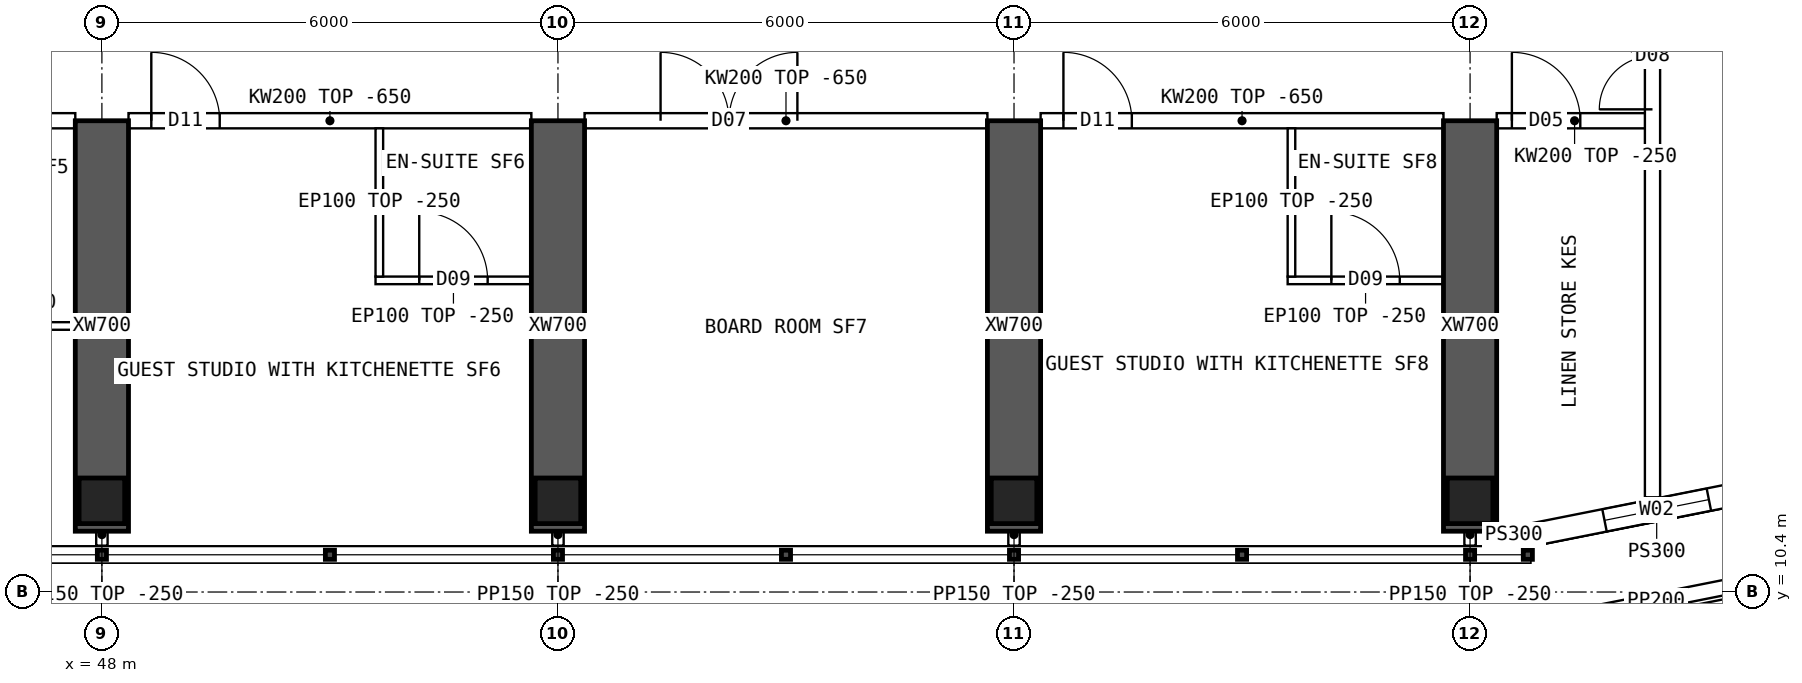
"""IFC4 building model, lengths in metres.
Left out: names, types, materials, properties, quantities, classifications, styles, units other than length and angle.
Written with IfcOpenShell. Run it as: python <this file> out.ifc"""

import sys

from ifc_helpers import new_model, si_unit, direction, frame, frame_2d, origin, origin_2d, place, context, subcontext, project, spatial, polyline, rectangle, hollow_rectangle, outline, extrude, element, fill, save


model = new_model("IFC4")
c1 = context("Model", 3, precision=1e-05, world=origin(), true_north=direction((0.0, 1.0)))
c2 = subcontext(c1, "Body", "Model", "MODEL_VIEW")
j1 = project(units=[si_unit("LENGTHUNIT", "METRE"), si_unit("PLANEANGLEUNIT", "RADIAN")], contexts=[c1])
p1 = place(None, origin())
s1 = spatial("IfcSite", under=j1, at=p1, CompositionType="ELEMENT")
p2 = place(p1, origin())
s2 = spatial("IfcBuilding", under=s1, at=p2, CompositionType="ELEMENT")
p3 = place(p2, frame((0.0, 0.0, 208.3)))
s3 = spatial("IfcBuildingStorey", under=s2, at=p3, CompositionType="ELEMENT", Elevation=208.3)
for number, where, z_axis, x_axis in (
    (1, (48.0, 11.6, 0.0), (0.0, 0.0, 1.0), (1.0, 0.0, 0.0)),
    (2, (54.0, 11.6, 0.0), (0.0, 0.0, 1.0), (1.0, 0.0, 0.0)),
    (3, (60.0, 11.6, 0.0), (0.0, 0.0, 1.0), (1.0, 0.0, 0.0)),
    (4, (66.0, 11.6, 0.0), (0.0, 0.0, 1.0), (1.0, 0.0, 0.0)),
):
    element("IfcColumn", number, at=place(p3, frame(where, z_axis=z_axis, x_axis=x_axis)), inside=s3, PredefinedType="COLUMN", context=c2, shape_type="SweptSolid", body=[
        extrude(hollow_rectangle(XDim=0.6, YDim=0.6, WallThickness=0.06, at=origin_2d()), origin(), (0.0, 0.0, 1.0), 4.5),
    ])
for number, where, z_axis, x_axis in (
    (5, (48.0, 11.2, 0.0), (0.0, 0.0, 1.0), (0.0, 1.0, 0.0)),
    (6, (54.0, 11.2, 0.0), (0.0, 0.0, 1.0), (0.0, 1.0, 0.0)),
    (7, (60.0, 11.2, 0.0), (0.0, 0.0, 1.0), (0.0, 1.0, 0.0)),
    (8, (66.0, 11.2, 0.0), (0.0, 0.0, 1.0), (0.0, 1.0, 0.0)),
):
    element("IfcWall", number, at=place(p3, frame(where, z_axis=z_axis, x_axis=x_axis)), inside=s3, PredefinedType="SHEAR", context=c2, shape_type="SweptSolid", body=[
        extrude(rectangle(XDim=5.4, YDim=0.7, at=frame_2d((2.7, 0.0))), origin(), (0.0, 0.0, 1.0), 4.5),
    ])
p4 = place(p3, frame((66.8, 11.15, 0.0), z_axis=(0.0, 0.0, 1.0), x_axis=(0.98078325777, 0.195100490205, 0.0)))
e9 = element("IfcWall", 9, at=p4, inside=s3, PredefinedType="SOLIDWALL", context=c2, shape_type="SweptSolid", body=[
    extrude(outline(polyline([(-0.03, -0.15), (3.405, -0.15), (3.345, 0.15), (0.03, 0.15), (-0.03, -0.15)])), origin(), (0.0, 0.0, 1.0), 4.25),
])
p5 = place(p4, frame((0.988, 0.0, 0.9)))
e10 = element("IfcOpeningElement", 10, at=p5, cuts=e9, PredefinedType="OPENING", context=c2, shape_type="SweptSolid", body=[
    extrude(rectangle(XDim=1.4, YDim=1.8, at=frame_2d((0.7, 0.9))), frame((0.0, 0.16, 0.0), z_axis=(0.0, -1.0, 0.0), x_axis=(1.0, 0.0, 0.0)), (0.0, 0.0, 1.0), 0.32),
])
p6 = place(p3, frame((66.8, 11.15, 0.0), z_axis=(0.0, 0.0, 1.0), x_axis=(-1.0, 0.0, 0.0)))
e11 = element("IfcWall", 11, at=p6, inside=s3, PredefinedType="SOLIDWALL", context=c2, shape_type="SweptSolid", body=[
    extrude(rectangle(XDim=0.45, YDim=0.3, at=frame_2d((0.225, 0.0))), origin(), (0.0, 0.0, 1.0), 4.25),
])
p7 = place(p3, frame((70.109, 10.611, 0.0), z_axis=(0.0, 0.0, 1.0), x_axis=(-0.980787925163, -0.195077025438, 0.0)))
e12 = element("IfcWall", 12, at=p7, inside=s3, PredefinedType="PARAPET", context=c2, shape_type="SweptSolid", body=[
    extrude(rectangle(XDim=3.389, YDim=0.2, at=frame_2d((1.695, 0.0))), origin(), (0.0, 0.0, 1.0), 1.1),
])
p8 = place(p3, frame((42.35, 16.6, 0.0), z_axis=(0.0, 0.0, 1.0), x_axis=(1.0, 0.0, 0.0)))
e13 = element("IfcWall", 13, at=p8, inside=s3, PredefinedType="SOLIDWALL", context=c2, shape_type="SweptSolid", body=[
    extrude(outline(polyline([(0.0, 0.0), (5.3, 0.0), (5.3, 3.85), (0.0, 3.85), (0.0, 0.0)])), frame((0.0, 0.1, 0.0), z_axis=(0.0, -1.0, 0.0), x_axis=(1.0, 0.0, 0.0)), (0.0, 0.0, 1.0), 0.2),
])
p9 = place(p8, frame((0.3, 0.0, 0.0)))
e14 = element("IfcOpeningElement", 14, at=p9, cuts=e13, PredefinedType="OPENING", context=c2, shape_type="SweptSolid", body=[
    extrude(rectangle(XDim=1.0, YDim=2.1, at=frame_2d((0.5, 1.05))), frame((0.0, 0.11, 0.0), z_axis=(0.0, -1.0, 0.0), x_axis=(1.0, 0.0, 0.0)), (0.0, 0.0, 1.0), 0.22),
])
p10 = place(p3, frame((48.35, 16.6, 0.0), z_axis=(0.0, 0.0, 1.0), x_axis=(1.0, 0.0, 0.0)))
e15 = element("IfcWall", 15, at=p10, inside=s3, PredefinedType="SOLIDWALL", context=c2, shape_type="SweptSolid", body=[
    extrude(outline(polyline([(0.0, 0.0), (5.3, 0.0), (5.3, 3.85), (0.0, 3.85), (0.0, 0.0)])), frame((0.0, 0.1, 0.0), z_axis=(0.0, -1.0, 0.0), x_axis=(1.0, 0.0, 0.0)), (0.0, 0.0, 1.0), 0.2),
])
p11 = place(p10, frame((0.3, 0.0, 0.0)))
e16 = element("IfcOpeningElement", 16, at=p11, cuts=e15, PredefinedType="OPENING", context=c2, shape_type="SweptSolid", body=[
    extrude(rectangle(XDim=0.9, YDim=2.1, at=frame_2d((0.45, 1.05))), frame((0.0, 0.11, 0.0), z_axis=(0.0, -1.0, 0.0), x_axis=(1.0, 0.0, 0.0)), (0.0, 0.0, 1.0), 0.22),
])
p12 = place(p3, frame((54.35, 16.6, 0.0), z_axis=(0.0, 0.0, 1.0), x_axis=(1.0, 0.0, 0.0)))
e17 = element("IfcWall", 17, at=p12, inside=s3, PredefinedType="SOLIDWALL", context=c2, shape_type="SweptSolid", body=[
    extrude(outline(polyline([(0.0, 0.0), (5.3, 0.0), (5.3, 3.85), (0.0, 3.85), (0.0, 0.0)])), frame((0.0, 0.1, 0.0), z_axis=(0.0, -1.0, 0.0), x_axis=(1.0, 0.0, 0.0)), (0.0, 0.0, 1.0), 0.2),
])
p13 = place(p12, frame((1.0, 0.0, 0.0)))
e18 = element("IfcOpeningElement", 18, at=p13, cuts=e17, PredefinedType="OPENING", context=c2, shape_type="SweptSolid", body=[
    extrude(rectangle(XDim=1.8, YDim=2.1, at=frame_2d((0.9, 1.05))), frame((0.0, 0.11, 0.0), z_axis=(0.0, -1.0, 0.0), x_axis=(1.0, 0.0, 0.0)), (0.0, 0.0, 1.0), 0.22),
])
p14 = place(p3, frame((60.35, 16.6, 0.0), z_axis=(0.0, 0.0, 1.0), x_axis=(1.0, 0.0, 0.0)))
e19 = element("IfcWall", 19, at=p14, inside=s3, PredefinedType="SOLIDWALL", context=c2, shape_type="SweptSolid", body=[
    extrude(outline(polyline([(0.0, 0.0), (5.3, 0.0), (5.3, 3.85), (0.0, 3.85), (0.0, 0.0)])), frame((0.0, 0.1, 0.0), z_axis=(0.0, -1.0, 0.0), x_axis=(1.0, 0.0, 0.0)), (0.0, 0.0, 1.0), 0.2),
])
p15 = place(p14, frame((0.3, 0.0, 0.0)))
e20 = element("IfcOpeningElement", 20, at=p15, cuts=e19, PredefinedType="OPENING", context=c2, shape_type="SweptSolid", body=[
    extrude(rectangle(XDim=0.9, YDim=2.1, at=frame_2d((0.45, 1.05))), frame((0.0, 0.11, 0.0), z_axis=(0.0, -1.0, 0.0), x_axis=(1.0, 0.0, 0.0)), (0.0, 0.0, 1.0), 0.22),
])
p16 = place(p3, frame((66.35, 16.6, 0.0), z_axis=(0.0, 0.0, 1.0), x_axis=(1.0, 0.0, 0.0)))
e21 = element("IfcWall", 21, at=p16, inside=s3, PredefinedType="SOLIDWALL", context=c2, shape_type="SweptSolid", body=[
    extrude(rectangle(XDim=2.05, YDim=0.2, at=frame_2d((1.025, 0.0))), origin(), (0.0, 0.0, 1.0), 4.25),
])
p17 = place(p16, frame((0.2, 0.0, 0.0)))
e22 = element("IfcOpeningElement", 22, at=p17, cuts=e21, PredefinedType="OPENING", context=c2, shape_type="SweptSolid", body=[
    extrude(rectangle(XDim=0.9, YDim=2.1, at=frame_2d((0.45, 1.05))), frame((0.0, 0.11, 0.0), z_axis=(0.0, -1.0, 0.0), x_axis=(1.0, 0.0, 0.0)), (0.0, 0.0, 1.0), 0.22),
])
p18 = place(p3, frame((45.0, 13.9, 0.0), z_axis=(0.0, 0.0, 1.0), x_axis=(1.0, 0.0, 0.0)))
e23 = element("IfcWall", 23, at=p18, inside=s3, PredefinedType="PARTITIONING", context=c2, shape_type="SweptSolid", body=[
    extrude(rectangle(XDim=2.65, YDim=0.1, at=frame_2d((1.325, 0.0))), origin(), (0.0, 0.0, 1.0), 4.25),
])
p19 = place(p3, frame((53.65, 14.5, 0.0), z_axis=(0.0, 0.0, 1.0), x_axis=(-1.0, 0.0, 0.0)))
e24 = element("IfcWall", 24, at=p19, inside=s3, PredefinedType="PARTITIONING", context=c2, shape_type="SweptSolid", body=[
    extrude(rectangle(XDim=2.05, YDim=0.1, at=frame_2d((1.025, 0.0))), origin(), (0.0, 0.0, 1.0), 4.25),
])
p20 = place(p19, frame((0.575, 0.0, 0.0)))
e25 = element("IfcOpeningElement", 25, at=p20, cuts=e24, PredefinedType="OPENING", context=c2, shape_type="SweptSolid", body=[
    extrude(rectangle(XDim=0.9, YDim=2.1, at=frame_2d((0.45, 1.05))), frame((0.0, 0.06, 0.0), z_axis=(0.0, -1.0, 0.0), x_axis=(1.0, 0.0, 0.0)), (0.0, 0.0, 1.0), 0.12),
])
p21 = place(p3, frame((51.65, 14.55, 0.0), z_axis=(0.0, 0.0, 1.0), x_axis=(0.0, 1.0, 0.0)))
e26 = element("IfcWall", 26, at=p21, inside=s3, PredefinedType="PARTITIONING", context=c2, shape_type="SweptSolid", body=[
    extrude(outline(polyline([(0.0, 0.0), (1.95, 0.0), (1.95, 3.85), (1.902, 3.85), (1.9, 4.25), (0.0, 4.25), (0.0, 0.0)])), frame((0.0, 0.05, 0.0), z_axis=(0.0, -1.0, 0.0), x_axis=(1.0, 0.0, 0.0)), (0.0, 0.0, 1.0), 0.1),
])
p22 = place(p3, frame((65.65, 14.5, 0.0), z_axis=(0.0, 0.0, 1.0), x_axis=(-1.0, 0.0, 0.0)))
e27 = element("IfcWall", 27, at=p22, inside=s3, PredefinedType="PARTITIONING", context=c2, shape_type="SweptSolid", body=[
    extrude(rectangle(XDim=2.05, YDim=0.1, at=frame_2d((1.025, 0.0))), origin(), (0.0, 0.0, 1.0), 4.25),
])
p23 = place(p22, frame((0.575, 0.0, 0.0)))
e28 = element("IfcOpeningElement", 28, at=p23, cuts=e27, PredefinedType="OPENING", context=c2, shape_type="SweptSolid", body=[
    extrude(rectangle(XDim=0.9, YDim=2.1, at=frame_2d((0.45, 1.05))), frame((0.0, 0.06, 0.0), z_axis=(0.0, -1.0, 0.0), x_axis=(1.0, 0.0, 0.0)), (0.0, 0.0, 1.0), 0.12),
])
p24 = place(p3, frame((63.65, 14.55, 0.0), z_axis=(0.0, 0.0, 1.0), x_axis=(0.0, 1.0, 0.0)))
e29 = element("IfcWall", 29, at=p24, inside=s3, PredefinedType="PARTITIONING", context=c2, shape_type="SweptSolid", body=[
    extrude(outline(polyline([(0.0, 0.0), (1.95, 0.0), (1.95, 3.85), (1.902, 3.85), (1.9, 4.25), (0.0, 4.25), (0.0, 0.0)])), frame((0.0, 0.05, 0.0), z_axis=(0.0, -1.0, 0.0), x_axis=(1.0, 0.0, 0.0)), (0.0, 0.0, 1.0), 0.1),
])
p25 = place(p3, frame((68.4, 11.646, 0.0), z_axis=(0.0, 0.0, 1.0), x_axis=(0.0, 1.0, 0.0)))
e30 = element("IfcWall", 30, at=p25, inside=s3, PredefinedType="SOLIDWALL", context=c2, shape_type="SweptSolid", body=[
    extrude(rectangle(XDim=40.708, YDim=0.2, at=frame_2d((20.354, 0.0))), origin(), (0.0, 0.0, 1.0), 4.25),
])
p26 = place(p25, frame((13.434, 0.0, 0.0)))
e31 = element("IfcOpeningElement", 31, at=p26, cuts=e30, PredefinedType="OPENING", context=c2, shape_type="SweptSolid", body=[
    extrude(rectangle(XDim=1.2, YDim=2.1, at=frame_2d((0.6, 1.05))), frame((0.0, 0.11, 0.0), z_axis=(0.0, -1.0, 0.0), x_axis=(1.0, 0.0, 0.0)), (0.0, 0.0, 1.0), 0.22),
])
p27 = place(p25, frame((21.194, 0.0, 0.0)))
e32 = element("IfcOpeningElement", 32, at=p27, cuts=e30, PredefinedType="OPENING", context=c2, shape_type="SweptSolid", body=[
    extrude(rectangle(XDim=1.2, YDim=2.1, at=frame_2d((0.6, 1.05))), frame((0.0, 0.11, 0.0), z_axis=(0.0, -1.0, 0.0), x_axis=(1.0, 0.0, 0.0)), (0.0, 0.0, 1.0), 0.22),
])
p28 = place(p25, frame((5.104, 0.0, 0.0)))
e33 = element("IfcOpeningElement", 33, at=p28, cuts=e30, PredefinedType="OPENING", context=c2, shape_type="SweptSolid", body=[
    extrude(rectangle(XDim=1.4, YDim=2.1, at=frame_2d((0.7, 1.05))), frame((0.0, 0.11, 0.0), z_axis=(0.0, -1.0, 0.0), x_axis=(1.0, 0.0, 0.0)), (0.0, 0.0, 1.0), 0.22),
])
p29 = place(p25, frame((34.104, 0.0, 0.0)))
e34 = element("IfcOpeningElement", 34, at=p29, cuts=e30, PredefinedType="OPENING", context=c2, shape_type="SweptSolid", body=[
    extrude(rectangle(XDim=1.4, YDim=2.1, at=frame_2d((0.7, 1.05))), frame((0.0, 0.11, 0.0), z_axis=(0.0, -1.0, 0.0), x_axis=(1.0, 0.0, 0.0)), (0.0, 0.0, 1.0), 0.22),
])
for number, where, z_axis, x_axis in (
    (35, (48.0, 11.3, 0.0), (0.0, 0.0, 1.0), (0.0, -1.0, 0.0)),
    (36, (54.0, 11.3, 0.0), (0.0, 0.0, 1.0), (0.0, -1.0, 0.0)),
    (37, (60.0, 11.3, 0.0), (0.0, 0.0, 1.0), (0.0, -1.0, 0.0)),
    (38, (66.0, 11.3, 0.0), (0.0, 0.0, 1.0), (0.0, -1.0, 0.0)),
):
    element("IfcWall", number, at=place(p3, frame(where, z_axis=z_axis, x_axis=x_axis)), inside=s3, PredefinedType="PARTITIONING", context=c2, shape_type="SweptSolid", body=[
        extrude(rectangle(XDim=0.29, YDim=0.15, at=frame_2d((0.145, 0.0))), origin(), (0.0, 0.0, 1.0), 4.25),
    ])
p30 = place(p5, origin())
e39 = element("IfcWindow", 39, at=p30, inside=s3, PartitioningType="SINGLE_PANEL", PredefinedType="WINDOW", context=c2, shape_type="SweptSolid", body=[
    extrude(rectangle(XDim=1.4, YDim=1.8, at=frame_2d((0.7, 0.9))), frame((0.0, 0.03, 0.0), z_axis=(0.0, -1.0, 0.0), x_axis=(1.0, 0.0, 0.0)), (0.0, 0.0, 1.0), 0.06),
])
fill(e10, e39)
p31 = place(p20, origin())
e40 = element("IfcDoor", 40, at=p31, inside=s3, OperationType="SINGLE_SWING_RIGHT", PredefinedType="DOOR", context=c2, shape_type="SweptSolid", body=[
    extrude(rectangle(XDim=0.9, YDim=2.1, at=frame_2d((0.45, 1.05))), frame((0.0, 0.025, 0.0), z_axis=(0.0, -1.0, 0.0), x_axis=(1.0, 0.0, 0.0)), (0.0, 0.0, 1.0), 0.05),
])
fill(e25, e40)
p32 = place(p11, origin())
e41 = element("IfcDoor", 41, at=p32, inside=s3, OperationType="SINGLE_SWING_LEFT", PredefinedType="DOOR", context=c2, shape_type="SweptSolid", body=[
    extrude(rectangle(XDim=0.9, YDim=2.1, at=frame_2d((0.45, 1.05))), frame((0.0, 0.025, 0.0), z_axis=(0.0, -1.0, 0.0), x_axis=(1.0, 0.0, 0.0)), (0.0, 0.0, 1.0), 0.05),
])
fill(e16, e41)
p33 = place(p13, origin())
e42 = element("IfcDoor", 42, at=p33, inside=s3, OperationType="DOUBLE_DOOR_SINGLE_SWING", PredefinedType="DOOR", context=c2, shape_type="SweptSolid", body=[
    extrude(rectangle(XDim=1.8, YDim=2.1, at=frame_2d((0.9, 1.05))), frame((0.0, 0.025, 0.0), z_axis=(0.0, -1.0, 0.0), x_axis=(1.0, 0.0, 0.0)), (0.0, 0.0, 1.0), 0.05),
])
fill(e18, e42)
p34 = place(p23, origin())
e43 = element("IfcDoor", 43, at=p34, inside=s3, OperationType="SINGLE_SWING_RIGHT", PredefinedType="DOOR", context=c2, shape_type="SweptSolid", body=[
    extrude(rectangle(XDim=0.9, YDim=2.1, at=frame_2d((0.45, 1.05))), frame((0.0, 0.025, 0.0), z_axis=(0.0, -1.0, 0.0), x_axis=(1.0, 0.0, 0.0)), (0.0, 0.0, 1.0), 0.05),
])
fill(e28, e43)
p35 = place(p15, origin())
e44 = element("IfcDoor", 44, at=p35, inside=s3, OperationType="SINGLE_SWING_LEFT", PredefinedType="DOOR", context=c2, shape_type="SweptSolid", body=[
    extrude(rectangle(XDim=0.9, YDim=2.1, at=frame_2d((0.45, 1.05))), frame((0.0, 0.025, 0.0), z_axis=(0.0, -1.0, 0.0), x_axis=(1.0, 0.0, 0.0)), (0.0, 0.0, 1.0), 0.05),
])
fill(e20, e44)
p36 = place(p28, origin())
e45 = element("IfcDoor", 45, at=p36, inside=s3, OperationType="DOUBLE_DOOR_SINGLE_SWING", PredefinedType="DOOR", context=c2, shape_type="SweptSolid", body=[
    extrude(rectangle(XDim=1.4, YDim=2.1, at=frame_2d((0.7, 1.05))), frame((0.0, 0.025, 0.0), z_axis=(0.0, -1.0, 0.0), x_axis=(1.0, 0.0, 0.0)), (0.0, 0.0, 1.0), 0.05),
])
fill(e33, e45)
p37 = place(p17, origin())
e46 = element("IfcDoor", 46, at=p37, inside=s3, OperationType="SINGLE_SWING_LEFT", PredefinedType="DOOR", context=c2, shape_type="SweptSolid", body=[
    extrude(rectangle(XDim=0.9, YDim=2.1, at=frame_2d((0.45, 1.05))), frame((0.0, 0.025, 0.0), z_axis=(0.0, -1.0, 0.0), x_axis=(1.0, 0.0, 0.0)), (0.0, 0.0, 1.0), 0.05),
])
fill(e22, e46)
save(model, sys.argv[1])
